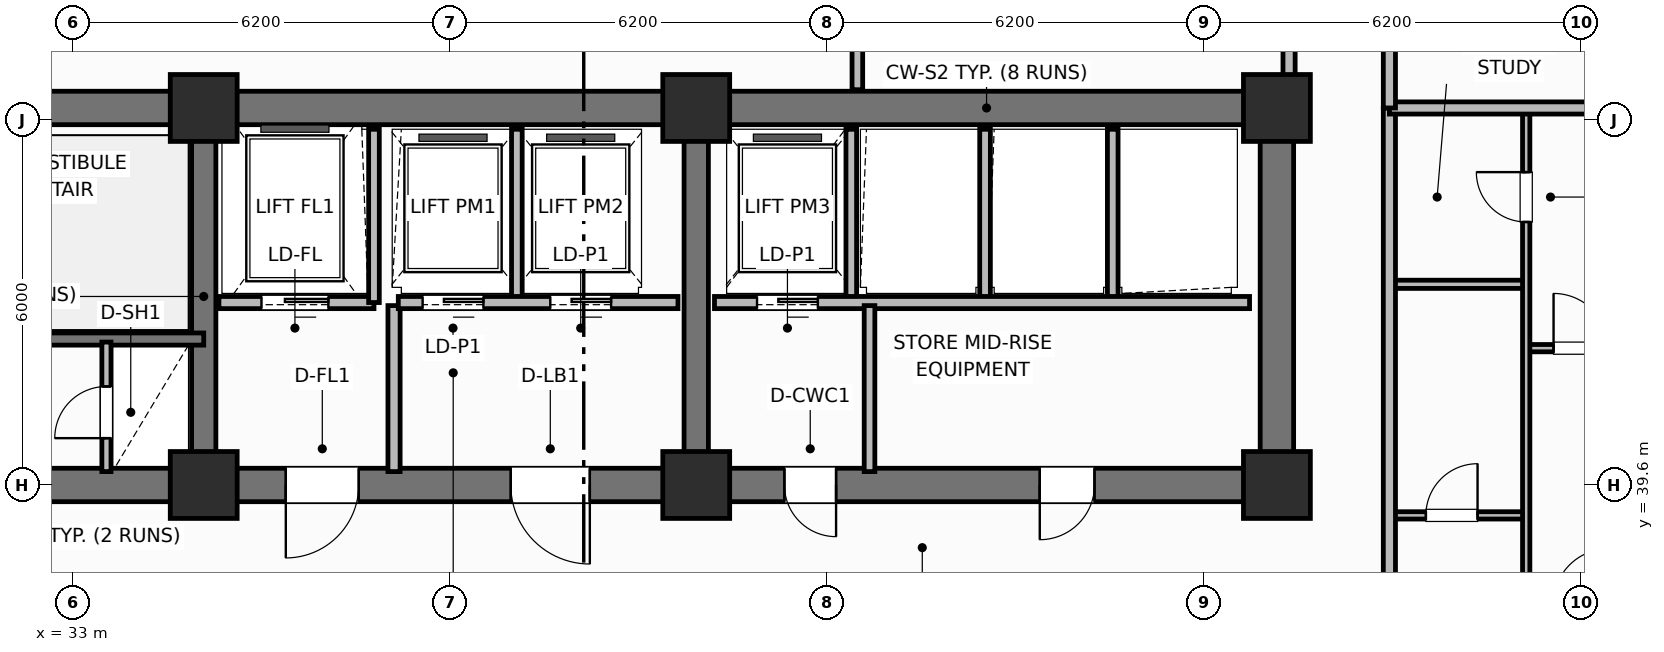
"""IFC4 building model, lengths in metres.
Left out: names, types, materials, properties, quantities, classifications, styles, units other than length and angle.
Written with IfcOpenShell. Run it as: python <this file> out.ifc"""

import sys

from ifc_helpers import new_model, si_unit, direction, frame, frame_2d, origin, origin_2d, place, context, subcontext, project, spatial, rectangle, extrude, element, fill, save


model = new_model("IFC4")
c1 = context("Model", 3, precision=1e-05, world=origin(), true_north=direction((0.0, 1.0)))
c2 = subcontext(c1, "Body", "Model", "MODEL_VIEW")
j1 = project(units=[si_unit("LENGTHUNIT", "METRE"), si_unit("PLANEANGLEUNIT", "RADIAN")], contexts=[c1])
p1 = place(None, origin())
s1 = spatial("IfcSite", under=j1, at=p1, CompositionType="ELEMENT")
p2 = place(p1, origin())
s2 = spatial("IfcBuilding", under=s1, at=p2, CompositionType="ELEMENT")
p3 = place(p2, frame((0.0, 0.0, 117.9)))
s3 = spatial("IfcBuildingStorey", under=s2, at=p3, CompositionType="ELEMENT", Elevation=117.9)
p4 = place(p3, frame((25.6, 45.8, 0.0), z_axis=(0.0, 0.0, 1.0), x_axis=(1.0, 0.0, 0.0)))
e1 = element("IfcWall", 1, at=p4, inside=s3, PredefinedType="SHEAR", context=c2, shape_type="SweptSolid", body=[
    extrude(rectangle(XDim=27.2, YDim=0.55, at=frame_2d((13.6, 0.0))), origin(), (0.0, 0.0, 1.0), 3.7),
])
p5 = place(p3, frame((52.8, 39.875, 0.0), z_axis=(0.0, 0.0, 1.0), x_axis=(0.0, 1.0, 0.0)))
e2 = element("IfcWall", 2, at=p5, inside=s3, PredefinedType="SHEAR", context=c2, shape_type="SweptSolid", body=[
    extrude(rectangle(XDim=5.65, YDim=0.55, at=frame_2d((2.825, 0.0))), origin(), (0.0, 0.0, 1.0), 3.7),
])
p6 = place(p3, frame((52.8, 39.6, 0.0), z_axis=(0.0, 0.0, 1.0), x_axis=(-1.0, 0.0, 0.0)))
e3 = element("IfcWall", 3, at=p6, inside=s3, PredefinedType="SHEAR", context=c2, shape_type="SweptSolid", body=[
    extrude(rectangle(XDim=27.2, YDim=0.55, at=frame_2d((13.6, 0.0))), origin(), (0.0, 0.0, 1.0), 3.7),
])
p7 = place(p6, frame((24.2, 0.0, 0.0)))
e4 = element("IfcOpeningElement", 4, at=p7, cuts=e3, PredefinedType="OPENING", context=c2, shape_type="SweptSolid", body=[
    extrude(rectangle(XDim=1.1, YDim=2.15, at=frame_2d((0.55, 1.075))), frame((0.0, 0.285, 0.0), z_axis=(0.0, -1.0, 0.0), x_axis=(1.0, 0.0, 0.0)), (0.0, 0.0, 1.0), 0.57),
])
p8 = place(p6, frame((15.1, 0.0, 0.0)))
e5 = element("IfcOpeningElement", 5, at=p8, cuts=e3, PredefinedType="OPENING", context=c2, shape_type="SweptSolid", body=[
    extrude(rectangle(XDim=1.2, YDim=2.15, at=frame_2d((0.6, 1.075))), frame((0.0, 0.285, 0.0), z_axis=(0.0, -1.0, 0.0), x_axis=(1.0, 0.0, 0.0)), (0.0, 0.0, 1.0), 0.57),
])
p9 = place(p6, frame((11.3, 0.0, 0.0)))
e6 = element("IfcOpeningElement", 6, at=p9, cuts=e3, PredefinedType="OPENING", context=c2, shape_type="SweptSolid", body=[
    extrude(rectangle(XDim=1.3, YDim=2.2, at=frame_2d((0.65, 1.1))), frame((0.0, 0.285, 0.0), z_axis=(0.0, -1.0, 0.0), x_axis=(1.0, 0.0, 0.0)), (0.0, 0.0, 1.0), 0.57),
])
p10 = place(p6, frame((7.25, 0.0, 0.0)))
e7 = element("IfcOpeningElement", 7, at=p10, cuts=e3, PredefinedType="OPENING", context=c2, shape_type="SweptSolid", body=[
    extrude(rectangle(XDim=0.85, YDim=2.1, at=frame_2d((0.425, 1.05))), frame((0.0, 0.285, 0.0), z_axis=(0.0, -1.0, 0.0), x_axis=(1.0, 0.0, 0.0)), (0.0, 0.0, 1.0), 0.57),
])
p11 = place(p6, frame((3.0, 0.0, 0.0)))
e8 = element("IfcOpeningElement", 8, at=p11, cuts=e3, PredefinedType="OPENING", context=c2, shape_type="SweptSolid", body=[
    extrude(rectangle(XDim=0.9, YDim=2.1, at=frame_2d((0.45, 1.05))), frame((0.0, 0.285, 0.0), z_axis=(0.0, -1.0, 0.0), x_axis=(1.0, 0.0, 0.0)), (0.0, 0.0, 1.0), 0.57),
])
for number, where, z_axis, x_axis in (
    (9, (35.15, 39.875, 0.0), (0.0, 0.0, 1.0), (0.0, 1.0, 0.0)),
    (10, (43.25, 39.875, 0.0), (0.0, 0.0, 1.0), (0.0, 1.0, 0.0)),
):
    element("IfcWall", number, at=place(p3, frame(where, z_axis=z_axis, x_axis=x_axis)), inside=s3, PredefinedType="SHEAR", context=c2, shape_type="SweptSolid", body=[
        extrude(rectangle(XDim=5.65, YDim=0.4, at=frame_2d((2.825, 0.0))), origin(), (0.0, 0.0, 1.0), 3.7),
    ])
for number, where, z_axis, x_axis in (
    (11, (35.15, 39.6, 0.0), (0.0, 0.0, 1.0), (1.0, 0.0, 0.0)),
    (12, (35.15, 45.8, 0.0), (0.0, 0.0, 1.0), (1.0, 0.0, 0.0)),
    (13, (43.25, 39.6, 0.0), (0.0, 0.0, 1.0), (1.0, 0.0, 0.0)),
    (14, (43.25, 45.8, 0.0), (0.0, 0.0, 1.0), (1.0, 0.0, 0.0)),
    (15, (52.8, 39.6, 0.0), (0.0, 0.0, 1.0), (1.0, 0.0, 0.0)),
    (16, (52.8, 45.8, 0.0), (0.0, 0.0, 1.0), (1.0, 0.0, 0.0)),
):
    element("IfcColumn", number, at=place(p3, frame(where, z_axis=z_axis, x_axis=x_axis)), inside=s3, PredefinedType="COLUMN", context=c2, shape_type="SweptSolid", body=[
        extrude(rectangle(XDim=1.1, YDim=1.1, at=origin_2d()), origin(), (0.0, 0.0, 1.0), 3.7),
    ])
p12 = place(p3, frame((35.15, 42.0, 0.0), z_axis=(0.0, 0.0, 1.0), x_axis=(-1.0, 0.0, 0.0)))
e17 = element("IfcWall", 17, at=p12, inside=s3, PredefinedType="SHEAR", context=c2, shape_type="SweptSolid", body=[
    extrude(rectangle(XDim=9.55, YDim=0.2, at=frame_2d((4.775, 0.0))), origin(), (0.0, 0.0, 1.0), 3.7),
])
p13 = place(p12, frame((7.25, 0.0, 0.0)))
e18 = element("IfcOpeningElement", 18, at=p13, cuts=e17, PredefinedType="OPENING", context=c2, shape_type="SweptSolid", body=[
    extrude(rectangle(XDim=1.1, YDim=2.15, at=frame_2d((0.55, 1.075))), frame((0.0, 0.11, 0.0), z_axis=(0.0, -1.0, 0.0), x_axis=(1.0, 0.0, 0.0)), (0.0, 0.0, 1.0), 0.22),
])
p14 = place(p3, frame((33.55, 39.82, 0.0), z_axis=(0.0, 0.0, 1.0), x_axis=(0.0, 1.0, 0.0)))
e19 = element("IfcWall", 19, at=p14, inside=s3, PredefinedType="PARTITIONING", context=c2, shape_type="SweptSolid", body=[
    extrude(rectangle(XDim=2.13, YDim=0.15, at=frame_2d((1.065, 0.0))), origin(), (0.0, 0.0, 1.0), 2.53),
])
p15 = place(p14, frame((0.55, 0.0, 0.0)))
e20 = element("IfcOpeningElement", 20, at=p15, cuts=e19, PredefinedType="OPENING", context=c2, shape_type="SweptSolid", body=[
    extrude(rectangle(XDim=0.85, YDim=2.05, at=frame_2d((0.425, 1.025))), frame((0.0, 0.085, 0.0), z_axis=(0.0, -1.0, 0.0), x_axis=(1.0, 0.0, 0.0)), (0.0, 0.0, 1.0), 0.17),
])
p16 = place(p3, frame((37.95, 42.6, 0.0), z_axis=(0.0, 0.0, 1.0), x_axis=(-1.0, 0.0, 0.0)))
e21 = element("IfcWall", 21, at=p16, inside=s3, PredefinedType="PARTITIONING", context=c2, shape_type="SweptSolid", body=[
    extrude(rectangle(XDim=2.55, YDim=0.2, at=frame_2d((1.275, 0.0))), origin(), (0.0, 0.0, 1.0), 2.3),
])
p17 = place(p16, frame((0.75, 0.0, 0.0)))
e22 = element("IfcOpeningElement", 22, at=p17, cuts=e21, PredefinedType="OPENING", context=c2, shape_type="SweptSolid", body=[
    extrude(rectangle(XDim=1.1, YDim=2.15, at=frame_2d((0.55, 1.075))), frame((0.0, 0.11, 0.0), z_axis=(0.0, -1.0, 0.0), x_axis=(1.0, 0.0, 0.0)), (0.0, 0.0, 1.0), 0.22),
])
p18 = place(p3, frame((37.95, 42.6, 0.0), z_axis=(0.0, 0.0, 1.0), x_axis=(0.0, 1.0, 0.0)))
e23 = element("IfcWall", 23, at=p18, inside=s3, PredefinedType="PARTITIONING", context=c2, shape_type="SweptSolid", body=[
    extrude(rectangle(XDim=2.85, YDim=0.175, at=frame_2d((1.425, 0.0))), origin(), (0.0, 0.0, 1.0), 2.53),
])
p19 = place(p3, frame((38.28, 39.82, 0.0), z_axis=(0.0, 0.0, 1.0), x_axis=(0.0, 1.0, 0.0)))
e24 = element("IfcWall", 24, at=p19, inside=s3, PredefinedType="PARTITIONING", context=c2, shape_type="SweptSolid", body=[
    extrude(rectangle(XDim=2.73, YDim=0.2, at=frame_2d((1.365, 0.0))), origin(), (0.0, 0.0, 1.0), 2.53),
])
p20 = place(p3, frame((40.3, 42.65, 0.0), z_axis=(0.0, 0.0, 1.0), x_axis=(0.0, 1.0, 0.0)))
e25 = element("IfcWall", 25, at=p20, inside=s3, PredefinedType="PARTITIONING", context=c2, shape_type="SweptSolid", body=[
    extrude(rectangle(XDim=2.8, YDim=0.175, at=frame_2d((1.4, 0.0))), origin(), (0.0, 0.0, 1.0), 2.53),
])
p21 = place(p3, frame((42.95, 42.6, 0.0), z_axis=(0.0, 0.0, 1.0), x_axis=(-1.0, 0.0, 0.0)))
e26 = element("IfcWall", 26, at=p21, inside=s3, PredefinedType="PARTITIONING", context=c2, shape_type="SweptSolid", body=[
    extrude(rectangle(XDim=4.6, YDim=0.2, at=frame_2d((2.3, 0.0))), origin(), (0.0, 0.0, 1.0), 2.3),
])
p22 = place(p21, frame((3.2, 0.0, 0.0)))
e27 = element("IfcOpeningElement", 27, at=p22, cuts=e26, PredefinedType="OPENING", context=c2, shape_type="SweptSolid", body=[
    extrude(rectangle(XDim=1.0, YDim=2.15, at=frame_2d((0.5, 1.075))), frame((0.0, 0.11, 0.0), z_axis=(0.0, -1.0, 0.0), x_axis=(1.0, 0.0, 0.0)), (0.0, 0.0, 1.0), 0.22),
])
p23 = place(p21, frame((1.1, 0.0, 0.0)))
e28 = element("IfcOpeningElement", 28, at=p23, cuts=e26, PredefinedType="OPENING", context=c2, shape_type="SweptSolid", body=[
    extrude(rectangle(XDim=1.0, YDim=2.15, at=frame_2d((0.5, 1.075))), frame((0.0, 0.11, 0.0), z_axis=(0.0, -1.0, 0.0), x_axis=(1.0, 0.0, 0.0)), (0.0, 0.0, 1.0), 0.22),
])
for number, where, z_axis, x_axis in (
    (29, (45.8, 42.65, 0.0), (0.0, 0.0, 1.0), (0.0, 1.0, 0.0)),
    (30, (48.0, 42.65, 0.0), (0.0, 0.0, 1.0), (0.0, 1.0, 0.0)),
    (31, (50.1, 42.65, 0.0), (0.0, 0.0, 1.0), (0.0, 1.0, 0.0)),
):
    element("IfcWall", number, at=place(p3, frame(where, z_axis=z_axis, x_axis=x_axis)), inside=s3, PredefinedType="PARTITIONING", context=c2, shape_type="SweptSolid", body=[
        extrude(rectangle(XDim=2.8, YDim=0.175, at=frame_2d((1.4, 0.0))), origin(), (0.0, 0.0, 1.0), 2.53),
    ])
p24 = place(p3, frame((52.35, 42.6, 0.0), z_axis=(0.0, 0.0, 1.0), x_axis=(-1.0, 0.0, 0.0)))
e32 = element("IfcWall", 32, at=p24, inside=s3, PredefinedType="PARTITIONING", context=c2, shape_type="SweptSolid", body=[
    extrude(rectangle(XDim=8.8, YDim=0.2, at=frame_2d((4.4, 0.0))), origin(), (0.0, 0.0, 1.0), 2.53),
])
p25 = place(p24, frame((7.1, 0.0, 0.0)))
e33 = element("IfcOpeningElement", 33, at=p25, cuts=e32, PredefinedType="OPENING", context=c2, shape_type="SweptSolid", body=[
    extrude(rectangle(XDim=1.0, YDim=2.15, at=frame_2d((0.5, 1.075))), frame((0.0, 0.11, 0.0), z_axis=(0.0, -1.0, 0.0), x_axis=(1.0, 0.0, 0.0)), (0.0, 0.0, 1.0), 0.22),
])
p26 = place(p3, frame((46.1, 39.82, 0.0), z_axis=(0.0, 0.0, 1.0), x_axis=(0.0, 1.0, 0.0)))
e34 = element("IfcWall", 34, at=p26, inside=s3, PredefinedType="PARTITIONING", context=c2, shape_type="SweptSolid", body=[
    extrude(rectangle(XDim=2.73, YDim=0.175, at=frame_2d((1.365, 0.0))), origin(), (0.0, 0.0, 1.0), 2.53),
])
p27 = place(p3, frame((54.65, 39.1, 0.0), z_axis=(0.0, 0.0, 1.0), x_axis=(1.0, 0.0, 0.0)))
e35 = element("IfcWall", 35, at=p27, inside=s3, PredefinedType="PARTITIONING", context=c2, shape_type="SweptSolid", body=[
    extrude(rectangle(XDim=2.25, YDim=0.12, at=frame_2d((1.125, 0.0))), origin(), (0.0, 0.0, 1.0), 2.53),
])
p28 = place(p27, frame((0.6, 0.0, 0.0)))
e36 = element("IfcOpeningElement", 36, at=p28, cuts=e35, PredefinedType="OPENING", context=c2, shape_type="SweptSolid", body=[
    extrude(rectangle(XDim=0.85, YDim=2.1, at=frame_2d((0.425, 1.05))), frame((0.0, 0.07, 0.0), z_axis=(0.0, -1.0, 0.0), x_axis=(1.0, 0.0, 0.0)), (0.0, 0.0, 1.0), 0.14),
])
p29 = place(p3, frame((54.65, 42.9, 0.0), z_axis=(0.0, 0.0, 1.0), x_axis=(1.0, 0.0, 0.0)))
e37 = element("IfcWall", 37, at=p29, inside=s3, PredefinedType="PARTITIONING", context=c2, shape_type="SweptSolid", body=[
    extrude(rectangle(XDim=2.25, YDim=0.135, at=frame_2d((1.125, 0.0))), origin(), (0.0, 0.0, 1.0), 2.53),
])
p30 = place(p3, frame((56.9, 41.85, 0.0), z_axis=(0.0, 0.0, 1.0), x_axis=(1.0, 0.0, 0.0)))
e38 = element("IfcWall", 38, at=p30, inside=s3, PredefinedType="PARTITIONING", context=c2, shape_type="SweptSolid", body=[
    extrude(rectangle(XDim=6.93, YDim=0.12, at=frame_2d((3.465, 0.0))), origin(), (0.0, 0.0, 1.0), 2.53),
])
p31 = place(p30, frame((0.45, 0.0, 0.0)))
e39 = element("IfcOpeningElement", 39, at=p31, cuts=e38, PredefinedType="OPENING", context=c2, shape_type="SweptSolid", body=[
    extrude(rectangle(XDim=0.9, YDim=2.1, at=frame_2d((0.45, 1.05))), frame((0.0, 0.07, 0.0), z_axis=(0.0, -1.0, 0.0), x_axis=(1.0, 0.0, 0.0)), (0.0, 0.0, 1.0), 0.14),
])
p32 = place(p3, frame((56.9, 33.74, 0.0), z_axis=(0.0, 0.0, 1.0), x_axis=(0.0, 1.0, 0.0)))
e40 = element("IfcWall", 40, at=p32, inside=s3, PredefinedType="PARTITIONING", context=c2, shape_type="SweptSolid", body=[
    extrude(rectangle(XDim=12.02, YDim=0.12, at=frame_2d((6.01, 0.0))), origin(), (0.0, 0.0, 1.0), 2.53),
])
p33 = place(p32, frame((0.41, 0.0, 0.0)))
e41 = element("IfcOpeningElement", 41, at=p33, cuts=e40, PredefinedType="OPENING", context=c2, shape_type="SweptSolid", body=[
    extrude(rectangle(XDim=0.9, YDim=2.1, at=frame_2d((0.45, 1.05))), frame((0.0, 0.07, 0.0), z_axis=(0.0, -1.0, 0.0), x_axis=(1.0, 0.0, 0.0)), (0.0, 0.0, 1.0), 0.14),
])
p34 = place(p32, frame((10.185, 0.0, 0.0)))
e42 = element("IfcOpeningElement", 42, at=p34, cuts=e40, PredefinedType="OPENING", context=c2, shape_type="SweptSolid", body=[
    extrude(rectangle(XDim=0.82, YDim=2.08, at=frame_2d((0.41, 1.04))), frame((0.0, 0.07, 0.0), z_axis=(0.0, -1.0, 0.0), x_axis=(1.0, 0.0, 0.0)), (0.0, 0.0, 1.0), 0.14),
])
p35 = place(p3, frame((54.65, 10.6, 0.0), z_axis=(0.0, 0.0, 1.0), x_axis=(0.0, 1.0, 0.0)))
e43 = element("IfcWall", 43, at=p35, inside=s3, PredefinedType="PARTITIONING", context=c2, shape_type="SweptSolid", body=[
    extrude(rectangle(XDim=35.2, YDim=0.2, at=frame_2d((17.6, 0.0))), origin(), (0.0, 0.0, 1.0), 2.53),
])
p36 = place(p35, frame((2.65, 0.0, 0.0)))
e44 = element("IfcOpeningElement", 44, at=p36, cuts=e43, PredefinedType="OPENING", context=c2, shape_type="SweptSolid", body=[
    extrude(rectangle(XDim=1.0, YDim=2.15, at=frame_2d((0.5, 1.075))), frame((0.0, 0.11, 0.0), z_axis=(0.0, -1.0, 0.0), x_axis=(1.0, 0.0, 0.0)), (0.0, 0.0, 1.0), 0.22),
])
p37 = place(p35, frame((12.518, 0.0, 0.0)))
e45 = element("IfcOpeningElement", 45, at=p37, cuts=e43, PredefinedType="OPENING", context=c2, shape_type="SweptSolid", body=[
    extrude(rectangle(XDim=1.0, YDim=2.15, at=frame_2d((0.5, 1.075))), frame((0.0, 0.11, 0.0), z_axis=(0.0, -1.0, 0.0), x_axis=(1.0, 0.0, 0.0)), (0.0, 0.0, 1.0), 0.22),
])
p38 = place(p35, frame((23.65, 0.0, 0.0)))
e46 = element("IfcOpeningElement", 46, at=p38, cuts=e43, PredefinedType="OPENING", context=c2, shape_type="SweptSolid", body=[
    extrude(rectangle(XDim=1.0, YDim=2.15, at=frame_2d((0.5, 1.075))), frame((0.0, 0.11, 0.0), z_axis=(0.0, -1.0, 0.0), x_axis=(1.0, 0.0, 0.0)), (0.0, 0.0, 1.0), 0.22),
])
p39 = place(p3, frame((54.65, 45.8, 0.0), z_axis=(0.0, 0.0, 1.0), x_axis=(1.0, 0.0, 0.0)))
e47 = element("IfcWall", 47, at=p39, inside=s3, PredefinedType="PARTITIONING", context=c2, shape_type="SweptSolid", body=[
    extrude(rectangle(XDim=8.76, YDim=0.2, at=frame_2d((4.38, 0.0))), origin(), (0.0, 0.0, 1.0), 2.53),
])
p40 = place(p3, frame((54.65, 45.8, 0.0), z_axis=(0.0, 0.0, 1.0), x_axis=(0.0, 1.0, 0.0)))
e48 = element("IfcWall", 48, at=p40, inside=s3, PredefinedType="PARTITIONING", context=c2, shape_type="SweptSolid", body=[
    extrude(rectangle(XDim=5.63, YDim=0.2, at=frame_2d((2.815, 0.0))), origin(), (0.0, 0.0, 1.0), 2.53),
])
p41 = place(p3, frame((45.9, 46.1, 0.0), z_axis=(0.0, 0.0, 1.0), x_axis=(0.0, 1.0, 0.0)))
e49 = element("IfcWall", 49, at=p41, inside=s3, PredefinedType="PARTITIONING", context=c2, shape_type="SweptSolid", body=[
    extrude(rectangle(XDim=5.33, YDim=0.175, at=frame_2d((2.665, 0.0))), origin(), (0.0, 0.0, 1.0), 2.53),
])
p42 = place(p3, frame((53.0, 46.1, 0.0), z_axis=(0.0, 0.0, 1.0), x_axis=(0.0, 1.0, 0.0)))
e50 = element("IfcWall", 50, at=p42, inside=s3, PredefinedType="PARTITIONING", context=c2, shape_type="SweptSolid", body=[
    extrude(rectangle(XDim=4.53, YDim=0.2, at=frame_2d((2.265, 0.0))), origin(), (0.0, 0.0, 1.0), 2.53),
])
p43 = place(p42, frame((1.05, 0.0, 0.0)))
e51 = element("IfcOpeningElement", 51, at=p43, cuts=e50, PredefinedType="OPENING", context=c2, shape_type="SweptSolid", body=[
    extrude(rectangle(XDim=0.9, YDim=2.1, at=frame_2d((0.45, 1.05))), frame((0.0, 0.11, 0.0), z_axis=(0.0, -1.0, 0.0), x_axis=(1.0, 0.0, 0.0)), (0.0, 0.0, 1.0), 0.22),
])
p44 = place(p15, origin())
e52 = element("IfcDoor", 52, at=p44, inside=s3, OperationType="SINGLE_SWING_LEFT", PredefinedType="TRAPDOOR", context=c2, shape_type="SweptSolid", body=[
    extrude(rectangle(XDim=0.85, YDim=2.05, at=frame_2d((0.425, 1.025))), frame((0.0, 0.025, 0.0), z_axis=(0.0, -1.0, 0.0), x_axis=(1.0, 0.0, 0.0)), (0.0, 0.0, 1.0), 0.05),
])
fill(e20, e52)
p45 = place(p17, origin())
e53 = element("IfcDoor", 53, at=p45, inside=s3, OperationType="SLIDING_TO_LEFT", PredefinedType="DOOR", context=c2, shape_type="SweptSolid", body=[
    extrude(rectangle(XDim=1.1, YDim=2.15, at=frame_2d((0.55, 1.075))), frame((0.0, 0.025, 0.0), z_axis=(0.0, -1.0, 0.0), x_axis=(1.0, 0.0, 0.0)), (0.0, 0.0, 1.0), 0.05),
])
fill(e22, e53)
p46 = place(p22, origin())
e54 = element("IfcDoor", 54, at=p46, inside=s3, OperationType="SLIDING_TO_LEFT", PredefinedType="DOOR", context=c2, shape_type="SweptSolid", body=[
    extrude(rectangle(XDim=1.0, YDim=2.15, at=frame_2d((0.5, 1.075))), frame((0.0, 0.025, 0.0), z_axis=(0.0, -1.0, 0.0), x_axis=(1.0, 0.0, 0.0)), (0.0, 0.0, 1.0), 0.05),
])
fill(e27, e54)
p47 = place(p23, origin())
e55 = element("IfcDoor", 55, at=p47, inside=s3, OperationType="SLIDING_TO_LEFT", PredefinedType="DOOR", context=c2, shape_type="SweptSolid", body=[
    extrude(rectangle(XDim=1.0, YDim=2.15, at=frame_2d((0.5, 1.075))), frame((0.0, 0.025, 0.0), z_axis=(0.0, -1.0, 0.0), x_axis=(1.0, 0.0, 0.0)), (0.0, 0.0, 1.0), 0.05),
])
fill(e28, e55)
p48 = place(p25, origin())
e56 = element("IfcDoor", 56, at=p48, inside=s3, OperationType="SLIDING_TO_LEFT", PredefinedType="DOOR", context=c2, shape_type="SweptSolid", body=[
    extrude(rectangle(XDim=1.0, YDim=2.15, at=frame_2d((0.5, 1.075))), frame((0.0, 0.025, 0.0), z_axis=(0.0, -1.0, 0.0), x_axis=(1.0, 0.0, 0.0)), (0.0, 0.0, 1.0), 0.05),
])
fill(e33, e56)
p49 = place(p28, origin())
e57 = element("IfcDoor", 57, at=p49, inside=s3, OperationType="SINGLE_SWING_RIGHT", PredefinedType="DOOR", context=c2, shape_type="SweptSolid", body=[
    extrude(rectangle(XDim=0.85, YDim=2.1, at=frame_2d((0.425, 1.05))), frame((0.0, 0.025, 0.0), z_axis=(0.0, -1.0, 0.0), x_axis=(1.0, 0.0, 0.0)), (0.0, 0.0, 1.0), 0.05),
])
fill(e36, e57)
p50 = place(p31, origin())
e58 = element("IfcDoor", 58, at=p50, inside=s3, OperationType="SINGLE_SWING_LEFT", PredefinedType="DOOR", context=c2, shape_type="SweptSolid", body=[
    extrude(rectangle(XDim=0.9, YDim=2.1, at=frame_2d((0.45, 1.05))), frame((0.0, 0.025, 0.0), z_axis=(0.0, -1.0, 0.0), x_axis=(1.0, 0.0, 0.0)), (0.0, 0.0, 1.0), 0.05),
])
fill(e39, e58)
p51 = place(p34, origin())
e59 = element("IfcDoor", 59, at=p51, inside=s3, OperationType="SINGLE_SWING_RIGHT", PredefinedType="DOOR", context=c2, shape_type="SweptSolid", body=[
    extrude(rectangle(XDim=0.82, YDim=2.08, at=frame_2d((0.41, 1.04))), frame((0.0, 0.025, 0.0), z_axis=(0.0, -1.0, 0.0), x_axis=(1.0, 0.0, 0.0)), (0.0, 0.0, 1.0), 0.05),
])
fill(e42, e59)
p52 = place(p8, origin())
e60 = element("IfcDoor", 60, at=p52, inside=s3, OperationType="SINGLE_SWING_RIGHT", PredefinedType="DOOR", context=c2, shape_type="SweptSolid", body=[
    extrude(rectangle(XDim=1.2, YDim=2.15, at=frame_2d((0.6, 1.075))), frame((0.0, 0.025, 0.0), z_axis=(0.0, -1.0, 0.0), x_axis=(1.0, 0.0, 0.0)), (0.0, 0.0, 1.0), 0.05),
])
fill(e5, e60)
p53 = place(p9, origin())
e61 = element("IfcDoor", 61, at=p53, inside=s3, OperationType="SINGLE_SWING_LEFT", PredefinedType="DOOR", context=c2, shape_type="SweptSolid", body=[
    extrude(rectangle(XDim=1.3, YDim=2.2, at=frame_2d((0.65, 1.1))), frame((0.0, 0.025, 0.0), z_axis=(0.0, -1.0, 0.0), x_axis=(1.0, 0.0, 0.0)), (0.0, 0.0, 1.0), 0.05),
])
fill(e6, e61)
p54 = place(p10, origin())
e62 = element("IfcDoor", 62, at=p54, inside=s3, OperationType="SINGLE_SWING_LEFT", PredefinedType="DOOR", context=c2, shape_type="SweptSolid", body=[
    extrude(rectangle(XDim=0.85, YDim=2.1, at=frame_2d((0.425, 1.05))), frame((0.0, 0.025, 0.0), z_axis=(0.0, -1.0, 0.0), x_axis=(1.0, 0.0, 0.0)), (0.0, 0.0, 1.0), 0.05),
])
fill(e7, e62)
p55 = place(p11, origin())
e63 = element("IfcDoor", 63, at=p55, inside=s3, OperationType="SINGLE_SWING_RIGHT", PredefinedType="DOOR", context=c2, shape_type="SweptSolid", body=[
    extrude(rectangle(XDim=0.9, YDim=2.1, at=frame_2d((0.45, 1.05))), frame((0.0, 0.025, 0.0), z_axis=(0.0, -1.0, 0.0), x_axis=(1.0, 0.0, 0.0)), (0.0, 0.0, 1.0), 0.05),
])
fill(e8, e63)
save(model, sys.argv[1])
